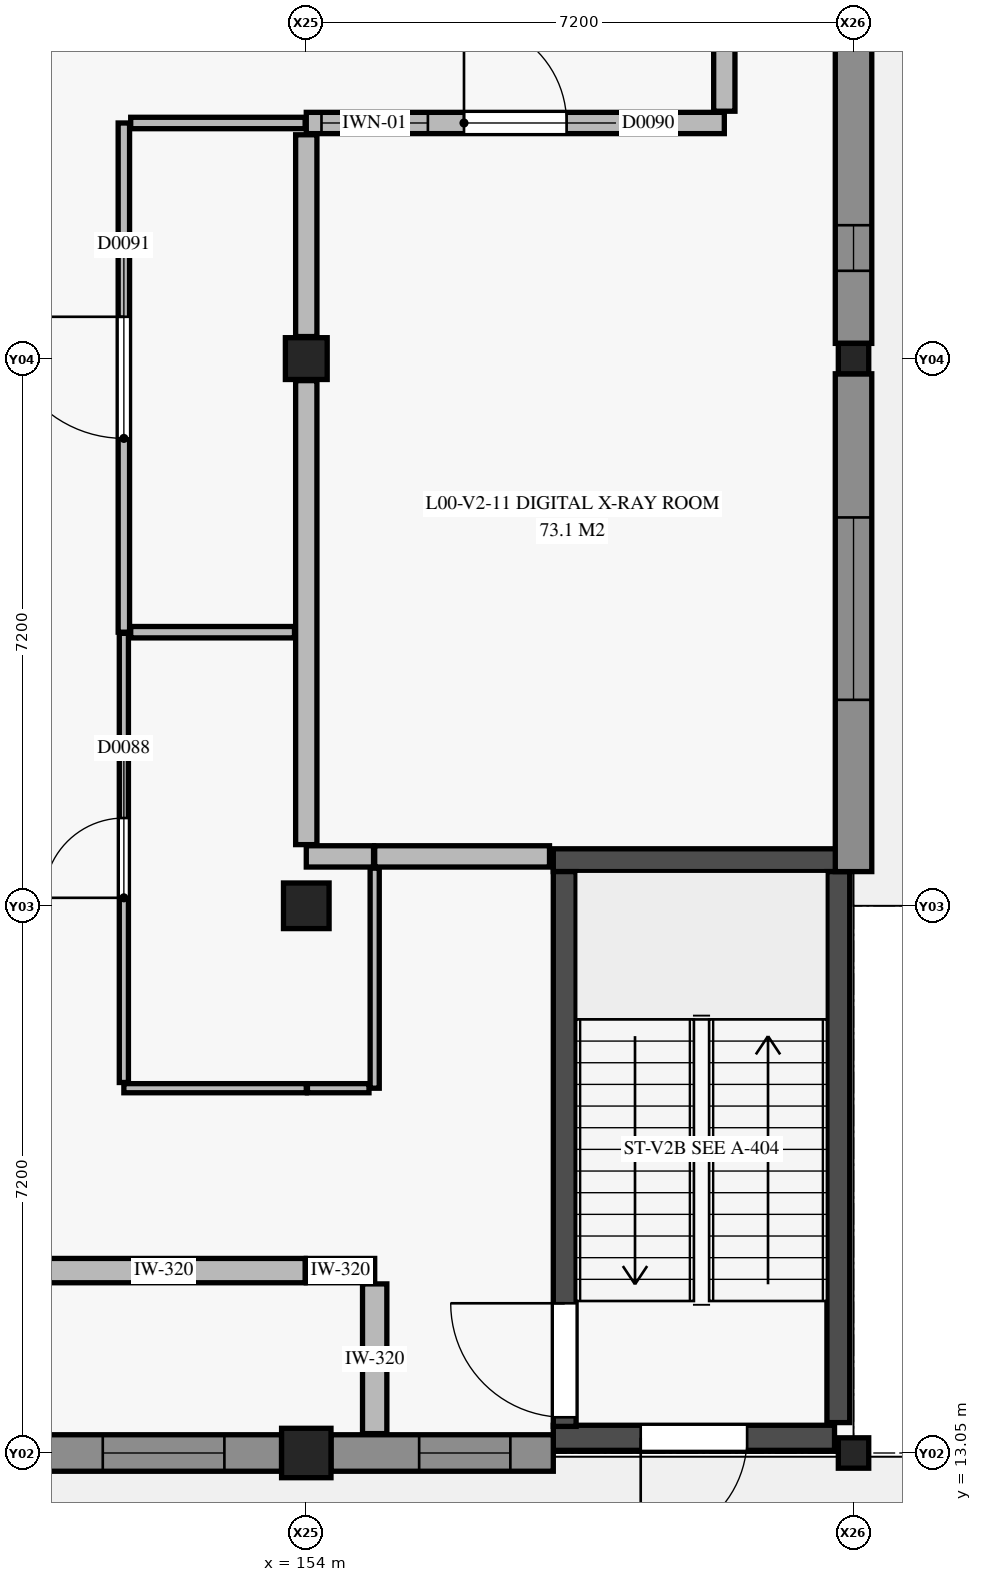
"""IFC4 building model, lengths in metres.
Left out: names, types, materials, properties, quantities, classifications, styles, units other than length and angle.
Written with IfcOpenShell. Run it as: python <this file> out.ifc"""

import sys

from ifc_helpers import new_model, si_unit, direction, frame, frame_2d, origin, origin_2d, place, context, subcontext, project, spatial, rectangle, extrude, element, fill, save


model = new_model("IFC4")
c1 = context("Model", 3, precision=1e-05, world=origin(), true_north=direction((0.0, 1.0)))
c2 = subcontext(c1, "Body", "Model", "MODEL_VIEW")
j1 = project(units=[si_unit("LENGTHUNIT", "METRE"), si_unit("PLANEANGLEUNIT", "RADIAN")], contexts=[c1])
p1 = place(None, origin())
s1 = spatial("IfcSite", under=j1, at=p1, CompositionType="ELEMENT")
p2 = place(p1, origin())
s2 = spatial("IfcBuilding", under=s1, at=p2, CompositionType="ELEMENT")
p3 = place(p2, origin())
s3 = spatial("IfcBuildingStorey", under=s2, at=p3, CompositionType="ELEMENT", Elevation=0.0)
p4 = place(p3, frame((154.0, 13.05, 0.0), z_axis=(0.0, 0.0, 1.0), x_axis=(1.0, 0.0, 0.0)))
e1 = element("IfcColumn", 1, at=p4, inside=s3, PredefinedType="COLUMN", context=c2, shape_type="SweptSolid", body=[
    extrude(rectangle(XDim=0.65, YDim=0.65, at=origin_2d()), origin(), (0.0, 0.0, 1.0), 4.8),
])
p5 = place(p3, frame((154.0, 20.25, 0.0), z_axis=(0.0, 0.0, 1.0), x_axis=(1.0, 0.0, 0.0)))
e2 = element("IfcColumn", 2, at=p5, inside=s3, PredefinedType="COLUMN", context=c2, shape_type="SweptSolid", body=[
    extrude(rectangle(XDim=0.6, YDim=0.6, at=origin_2d()), origin(), (0.0, 0.0, 1.0), 4.8),
])
p6 = place(p3, frame((154.0, 27.45, 0.0), z_axis=(0.0, 0.0, 1.0), x_axis=(1.0, 0.0, 0.0)))
e3 = element("IfcColumn", 3, at=p6, inside=s3, PredefinedType="COLUMN", context=c2, shape_type="SweptSolid", body=[
    extrude(rectangle(XDim=0.55, YDim=0.55, at=origin_2d()), origin(), (0.0, 0.0, 1.0), 4.8),
])
for number, where, z_axis, x_axis in (
    (4, (161.2, 27.45, 0.0), (0.0, 0.0, 1.0), (1.0, 0.0, 0.0)),
    (5, (161.2, 13.05, 0.0), (0.0, 0.0, 1.0), (1.0, 0.0, 0.0)),
):
    element("IfcColumn", number, at=place(p3, frame(where, z_axis=z_axis, x_axis=x_axis)), inside=s3, PredefinedType="COLUMN", context=c2, shape_type="SweptSolid", body=[
        extrude(rectangle(XDim=0.4, YDim=0.4, at=origin_2d()), origin(), (0.0, 0.0, 1.0), 4.8),
    ])
p7 = place(p3, frame((160.95, 13.25, 0.0), z_axis=(0.0, 0.0, 1.0), x_axis=(-1.0, 0.0, 0.0)))
e6 = element("IfcWall", 6, at=p7, inside=s3, PredefinedType="SHEAR", context=c2, shape_type="SweptSolid", body=[
    extrude(rectangle(XDim=3.7, YDim=0.33, at=frame_2d((1.85, 0.0))), origin(), (0.0, 0.0, 1.0), 4.46),
])
p8 = place(p7, frame((1.15, 0.0, 0.0)))
e7 = element("IfcOpeningElement", 7, at=p8, cuts=e6, PredefinedType="OPENING", context=c2, shape_type="SweptSolid", body=[
    extrude(rectangle(XDim=1.4, YDim=2.25, at=frame_2d((0.7, 1.125))), frame((0.0, 0.175, 0.0), z_axis=(0.0, -1.0, 0.0), x_axis=(1.0, 0.0, 0.0)), (0.0, 0.0, 1.0), 0.35),
])
p9 = place(p3, frame((157.25, 20.85, 0.0), z_axis=(0.0, 0.0, 1.0), x_axis=(1.0, 0.0, 0.0)))
e8 = element("IfcWall", 8, at=p9, inside=s3, PredefinedType="SHEAR", context=c2, shape_type="SweptSolid", body=[
    extrude(rectangle(XDim=3.9, YDim=0.3, at=frame_2d((1.95, 0.0))), origin(), (0.0, 0.0, 1.0), 4.46),
])
p10 = place(p3, frame((157.4, 13.4, 0.0), z_axis=(0.0, 0.0, 1.0), x_axis=(0.0, 1.0, 0.0)))
e9 = element("IfcWall", 9, at=p10, inside=s3, PredefinedType="SHEAR", context=c2, shape_type="SweptSolid", body=[
    extrude(rectangle(XDim=7.3, YDim=0.3, at=frame_2d((3.65, 0.0))), origin(), (0.0, 0.0, 1.0), 4.46),
])
p11 = place(p10, frame((0.12, 0.0, 0.0)))
e10 = element("IfcOpeningElement", 10, at=p11, cuts=e9, PredefinedType="OPENING", context=c2, shape_type="SweptSolid", body=[
    extrude(rectangle(XDim=1.5, YDim=2.15, at=frame_2d((0.75, 1.075))), frame((0.0, 0.16, 0.0), z_axis=(0.0, -1.0, 0.0), x_axis=(1.0, 0.0, 0.0)), (0.0, 0.0, 1.0), 0.32),
])
p12 = place(p3, frame((161.0, 13.45, 0.0), z_axis=(0.0, 0.0, 1.0), x_axis=(0.0, 1.0, 0.0)))
e11 = element("IfcWall", 11, at=p12, inside=s3, PredefinedType="SHEAR", context=c2, shape_type="SweptSolid", body=[
    extrude(rectangle(XDim=7.25, YDim=0.3, at=frame_2d((3.625, 0.0))), origin(), (0.0, 0.0, 1.0), 4.46),
])
p13 = place(p3, frame((157.25, 13.05, 0.0), z_axis=(0.0, 0.0, 1.0), x_axis=(-1.0, 0.0, 0.0)))
e12 = element("IfcWall", 12, at=p13, inside=s3, PredefinedType="SOLIDWALL", context=c2, shape_type="SweptSolid", body=[
    extrude(rectangle(XDim=2.925, YDim=0.48, at=frame_2d((1.462, 0.0))), origin(), (0.0, 0.0, 1.0), 3.64),
])
p14 = place(p13, frame((0.565, 0.0, 0.6)))
e13 = element("IfcOpeningElement", 13, at=p14, cuts=e12, PredefinedType="OPENING", context=c2, shape_type="SweptSolid", body=[
    extrude(rectangle(XDim=1.2, YDim=2.2, at=frame_2d((0.6, 1.1))), frame((0.0, 0.25, 0.0), z_axis=(0.0, -1.0, 0.0), x_axis=(1.0, 0.0, 0.0)), (0.0, 0.0, 1.0), 0.5),
])
p15 = place(p3, frame((153.675, 13.05, 0.0), z_axis=(0.0, 0.0, 1.0), x_axis=(-1.0, 0.0, 0.0)))
e14 = element("IfcWall", 14, at=p15, inside=s3, PredefinedType="SOLIDWALL", context=c2, shape_type="SweptSolid", body=[
    extrude(rectangle(XDim=3.105, YDim=0.48, at=frame_2d((1.552, 0.0))), origin(), (0.0, 0.0, 1.0), 3.64),
])
p16 = place(p15, frame((0.752, 0.0, 0.6)))
e15 = element("IfcOpeningElement", 15, at=p16, cuts=e14, PredefinedType="OPENING", context=c2, shape_type="SweptSolid", body=[
    extrude(rectangle(XDim=1.6, YDim=2.2, at=frame_2d((0.8, 1.1))), frame((0.0, 0.25, 0.0), z_axis=(0.0, -1.0, 0.0), x_axis=(1.0, 0.0, 0.0)), (0.0, 0.0, 1.0), 0.5),
])
p17 = place(p3, frame((161.2, 34.3, 0.0), z_axis=(0.0, 0.0, 1.0), x_axis=(0.0, -1.0, 0.0)))
e16 = element("IfcWall", 16, at=p17, inside=s3, PredefinedType="SOLIDWALL", context=c2, shape_type="SweptSolid", body=[
    extrude(rectangle(XDim=6.65, YDim=0.48, at=frame_2d((3.325, 0.0))), origin(), (0.0, 0.0, 1.0), 3.64),
])
p18 = place(p17, frame((1.65, 0.0, 0.6)))
e17 = element("IfcOpeningElement", 17, at=p18, cuts=e16, PredefinedType="OPENING", context=c2, shape_type="SweptSolid", body=[
    extrude(rectangle(XDim=0.8, YDim=2.6, at=frame_2d((0.4, 1.3))), frame((0.0, 0.25, 0.0), z_axis=(0.0, -1.0, 0.0), x_axis=(1.0, 0.0, 0.0)), (0.0, 0.0, 1.0), 0.5),
])
p19 = place(p17, frame((5.095, 0.0, 0.9)))
e18 = element("IfcOpeningElement", 18, at=p19, cuts=e16, PredefinedType="OPENING", context=c2, shape_type="SweptSolid", body=[
    extrude(rectangle(XDim=0.6, YDim=1.8, at=frame_2d((0.3, 0.9))), frame((0.0, 0.25, 0.0), z_axis=(0.0, -1.0, 0.0), x_axis=(1.0, 0.0, 0.0)), (0.0, 0.0, 1.0), 0.5),
])
p20 = place(p3, frame((161.2, 27.25, 0.0), z_axis=(0.0, 0.0, 1.0), x_axis=(0.0, -1.0, 0.0)))
e19 = element("IfcWall", 19, at=p20, inside=s3, PredefinedType="SOLIDWALL", context=c2, shape_type="SweptSolid", body=[
    extrude(rectangle(XDim=6.55, YDim=0.48, at=frame_2d((3.275, 0.0))), origin(), (0.0, 0.0, 1.0), 3.64),
])
p21 = place(p20, frame((1.89, 0.0, 0.6)))
e20 = element("IfcOpeningElement", 20, at=p21, cuts=e19, PredefinedType="OPENING", context=c2, shape_type="SweptSolid", body=[
    extrude(rectangle(XDim=2.4, YDim=2.2, at=frame_2d((1.2, 1.1))), frame((0.0, 0.25, 0.0), z_axis=(0.0, -1.0, 0.0), x_axis=(1.0, 0.0, 0.0)), (0.0, 0.0, 1.0), 0.5),
])
p22 = place(p3, frame((154.0, 15.45, 0.0), z_axis=(0.0, 0.0, 1.0), x_axis=(1.0, 0.0, 0.0)))
e21 = element("IfcWall", 21, at=p22, inside=s3, PredefinedType="PARTITIONING", context=c2, shape_type="SweptSolid", body=[
    extrude(rectangle(XDim=0.9, YDim=0.32, at=frame_2d((0.45, 0.0))), origin(), (0.0, 0.0, 1.0), 3.965),
])
p23 = place(p3, frame((154.9, 13.305, 0.0), z_axis=(0.0, 0.0, 1.0), x_axis=(0.0, 1.0, 0.0)))
e22 = element("IfcWall", 22, at=p23, inside=s3, PredefinedType="PARTITIONING", context=c2, shape_type="SweptSolid", body=[
    extrude(rectangle(XDim=1.97, YDim=0.32, at=frame_2d((0.985, 0.0))), origin(), (0.0, 0.0, 1.0), 4.46),
])
p24 = place(p3, frame((150.265, 15.45, 0.0), z_axis=(0.0, 0.0, 1.0), x_axis=(1.0, 0.0, 0.0)))
e23 = element("IfcWall", 23, at=p24, inside=s3, PredefinedType="PARTITIONING", context=c2, shape_type="SweptSolid", body=[
    extrude(rectangle(XDim=3.72, YDim=0.32, at=frame_2d((1.86, 0.0))), origin(), (0.0, 0.0, 1.0), 3.965),
])
p25 = place(p3, frame((154.9, 20.9, 0.0), z_axis=(0.0, 0.0, 1.0), x_axis=(1.0, 0.0, 0.0)))
e24 = element("IfcWall", 24, at=p25, inside=s3, PredefinedType="PARTITIONING", context=c2, shape_type="SweptSolid", body=[
    extrude(rectangle(XDim=2.3, YDim=0.28, at=frame_2d((1.15, 0.0))), origin(), (0.0, 0.0, 1.0), 4.46),
])
p26 = place(p3, frame((154.0, 30.55, 0.0), z_axis=(0.0, 0.0, 1.0), x_axis=(1.0, 0.0, 0.0)))
e25 = element("IfcWall", 25, at=p26, inside=s3, PredefinedType="PARTITIONING", context=c2, shape_type="SweptSolid", body=[
    extrude(rectangle(XDim=5.5, YDim=0.28, at=frame_2d((2.75, 0.0))), origin(), (0.0, 0.0, 1.0), 3.795),
])
p27 = place(p26, frame((2.075, 0.0, 0.0)))
e26 = element("IfcOpeningElement", 26, at=p27, cuts=e25, PredefinedType="OPENING", context=c2, shape_type="SweptSolid", body=[
    extrude(rectangle(XDim=1.35, YDim=2.2, at=frame_2d((0.675, 1.1))), frame((0.0, 0.15, 0.0), z_axis=(0.0, -1.0, 0.0), x_axis=(1.0, 0.0, 0.0)), (0.0, 0.0, 1.0), 0.3),
])
p28 = place(p26, frame((0.2, 0.0, 1.05)))
e27 = element("IfcOpeningElement", 27, at=p28, cuts=e25, PredefinedType="OPENING", context=c2, shape_type="SweptSolid", body=[
    extrude(rectangle(XDim=1.4, YDim=1.1, at=frame_2d((0.7, 0.55))), frame((0.0, 0.15, 0.0), z_axis=(0.0, -1.0, 0.0), x_axis=(1.0, 0.0, 0.0)), (0.0, 0.0, 1.0), 0.3),
])
p29 = place(p3, frame((159.5, 30.705, 0.0), z_axis=(0.0, 0.0, 1.0), x_axis=(0.0, 1.0, 0.0)))
e28 = element("IfcWall", 28, at=p29, inside=s3, PredefinedType="PARTITIONING", context=c2, shape_type="SweptSolid", body=[
    extrude(rectangle(XDim=2.13, YDim=0.28, at=frame_2d((1.065, 0.0))), origin(), (0.0, 0.0, 1.0), 3.985),
])
p30 = place(p3, frame((151.6, 23.85, 0.0), z_axis=(0.0, 0.0, 1.0), x_axis=(0.0, 1.0, 0.0)))
e29 = element("IfcWall", 29, at=p30, inside=s3, PredefinedType="PARTITIONING", context=c2, shape_type="SweptSolid", body=[
    extrude(rectangle(XDim=6.7, YDim=0.15, at=frame_2d((3.35, 0.0))), origin(), (0.0, 0.0, 1.0), 3.725),
])
p31 = place(p30, frame((2.55, 0.0, 0.0)))
e30 = element("IfcOpeningElement", 30, at=p31, cuts=e29, PredefinedType="OPENING", context=c2, shape_type="SweptSolid", body=[
    extrude(rectangle(XDim=1.6, YDim=2.25, at=frame_2d((0.8, 1.125))), frame((0.0, 0.085, 0.0), z_axis=(0.0, -1.0, 0.0), x_axis=(1.0, 0.0, 0.0)), (0.0, 0.0, 1.0), 0.17),
])
p32 = place(p3, frame((151.69, 30.55, 0.0), z_axis=(0.0, 0.0, 1.0), x_axis=(1.0, 0.0, 0.0)))
e31 = element("IfcWall", 31, at=p32, inside=s3, PredefinedType="PARTITIONING", context=c2, shape_type="SweptSolid", body=[
    extrude(rectangle(XDim=2.295, YDim=0.15, at=frame_2d((1.147, 0.0))), origin(), (0.0, 0.0, 1.0), 3.795),
])
p33 = place(p3, frame((151.6, 17.85, 0.0), z_axis=(0.0, 0.0, 1.0), x_axis=(1.0, 0.0, 0.0)))
e32 = element("IfcWall", 32, at=p33, inside=s3, PredefinedType="PARTITIONING", context=c2, shape_type="SweptSolid", body=[
    extrude(rectangle(XDim=2.4, YDim=0.12, at=frame_2d((1.2, 0.0))), origin(), (0.0, 0.0, 1.0), 3.965),
])
p34 = place(p3, frame((151.6, 17.925, 0.0), z_axis=(0.0, 0.0, 1.0), x_axis=(0.0, 1.0, 0.0)))
e33 = element("IfcWall", 33, at=p34, inside=s3, PredefinedType="PARTITIONING", context=c2, shape_type="SweptSolid", body=[
    extrude(rectangle(XDim=5.91, YDim=0.12, at=frame_2d((2.955, 0.0))), origin(), (0.0, 0.0, 1.0), 3.865),
])
p35 = place(p34, frame((2.43, 0.0, 0.0)))
e34 = element("IfcOpeningElement", 34, at=p35, cuts=e33, PredefinedType="OPENING", context=c2, shape_type="SweptSolid", body=[
    extrude(rectangle(XDim=1.05, YDim=2.15, at=frame_2d((0.525, 1.075))), frame((0.0, 0.07, 0.0), z_axis=(0.0, -1.0, 0.0), x_axis=(1.0, 0.0, 0.0)), (0.0, 0.0, 1.0), 0.14),
])
p36 = place(p3, frame((154.9, 17.85, 0.0), z_axis=(0.0, 0.0, 1.0), x_axis=(0.0, 1.0, 0.0)))
e35 = element("IfcWall", 35, at=p36, inside=s3, PredefinedType="PARTITIONING", context=c2, shape_type="SweptSolid", body=[
    extrude(rectangle(XDim=2.895, YDim=0.12, at=frame_2d((1.448, 0.0))), origin(), (0.0, 0.0, 1.0), 4.46),
])
p37 = place(p3, frame((154.015, 17.85, 0.0), z_axis=(0.0, 0.0, 1.0), x_axis=(1.0, 0.0, 0.0)))
e36 = element("IfcWall", 36, at=p37, inside=s3, PredefinedType="PARTITIONING", context=c2, shape_type="SweptSolid", body=[
    extrude(rectangle(XDim=0.81, YDim=0.12, at=frame_2d((0.405, 0.0))), origin(), (0.0, 0.0, 1.0), 3.965),
])
p38 = place(p3, frame((154.0, 20.9, 0.0), z_axis=(0.0, 0.0, 1.0), x_axis=(1.0, 0.0, 0.0)))
e37 = element("IfcWall", 37, at=p38, inside=s3, PredefinedType="PARTITIONING", context=c2, shape_type="SweptSolid", body=[
    extrude(rectangle(XDim=0.885, YDim=0.28, at=frame_2d((0.442, 0.0))), origin(), (0.0, 0.0, 1.0), 3.725),
])
p39 = place(p3, frame((154.0, 21.055, 0.0), z_axis=(0.0, 0.0, 1.0), x_axis=(0.0, 1.0, 0.0)))
e38 = element("IfcWall", 38, at=p39, inside=s3, PredefinedType="PARTITIONING", context=c2, shape_type="SweptSolid", body=[
    extrude(rectangle(XDim=6.105, YDim=0.28, at=frame_2d((3.052, 0.0))), origin(), (0.0, 0.0, 1.0), 3.725),
])
p40 = place(p3, frame((154.0, 27.74, 0.0), z_axis=(0.0, 0.0, 1.0), x_axis=(0.0, 1.0, 0.0)))
e39 = element("IfcWall", 39, at=p40, inside=s3, PredefinedType="PARTITIONING", context=c2, shape_type="SweptSolid", body=[
    extrude(rectangle(XDim=2.655, YDim=0.28, at=frame_2d((1.328, 0.0))), origin(), (0.0, 0.0, 1.0), 3.795),
])
p41 = place(p3, frame((151.69, 23.85, 0.0), z_axis=(0.0, 0.0, 1.0), x_axis=(1.0, 0.0, 0.0)))
e40 = element("IfcWall", 40, at=p41, inside=s3, PredefinedType="PARTITIONING", context=c2, shape_type="SweptSolid", body=[
    extrude(rectangle(XDim=2.155, YDim=0.15, at=frame_2d((1.078, 0.0))), origin(), (0.0, 0.0, 1.0), 4.46),
])
p42 = place(p8, origin())
e41 = element("IfcDoor", 41, at=p42, inside=s3, OperationType="SINGLE_SWING_RIGHT", PredefinedType="DOOR", context=c2, shape_type="SweptSolid", body=[
    extrude(rectangle(XDim=1.4, YDim=2.25, at=frame_2d((0.7, 1.125))), frame((0.0, 0.025, 0.0), z_axis=(0.0, -1.0, 0.0), x_axis=(1.0, 0.0, 0.0)), (0.0, 0.0, 1.0), 0.05),
])
fill(e7, e41)
p43 = place(p14, origin())
e42 = element("IfcWindow", 42, at=p43, inside=s3, PartitioningType="SINGLE_PANEL", PredefinedType="WINDOW", context=c2, shape_type="SweptSolid", body=[
    extrude(rectangle(XDim=1.2, YDim=2.2, at=frame_2d((0.6, 1.1))), frame((0.0, 0.03, 0.0), z_axis=(0.0, -1.0, 0.0), x_axis=(1.0, 0.0, 0.0)), (0.0, 0.0, 1.0), 0.06),
])
fill(e13, e42)
p44 = place(p16, origin())
e43 = element("IfcWindow", 43, at=p44, inside=s3, PartitioningType="SINGLE_PANEL", PredefinedType="WINDOW", context=c2, shape_type="SweptSolid", body=[
    extrude(rectangle(XDim=1.6, YDim=2.2, at=frame_2d((0.8, 1.1))), frame((0.0, 0.03, 0.0), z_axis=(0.0, -1.0, 0.0), x_axis=(1.0, 0.0, 0.0)), (0.0, 0.0, 1.0), 0.06),
])
fill(e15, e43)
p45 = place(p19, origin())
e44 = element("IfcWindow", 44, at=p45, inside=s3, PartitioningType="SINGLE_PANEL", PredefinedType="WINDOW", context=c2, shape_type="SweptSolid", body=[
    extrude(rectangle(XDim=0.6, YDim=1.8, at=frame_2d((0.3, 0.9))), frame((0.0, 0.03, 0.0), z_axis=(0.0, -1.0, 0.0), x_axis=(1.0, 0.0, 0.0)), (0.0, 0.0, 1.0), 0.06),
])
fill(e18, e44)
p46 = place(p21, origin())
e45 = element("IfcWindow", 45, at=p46, inside=s3, PartitioningType="SINGLE_PANEL", PredefinedType="WINDOW", context=c2, shape_type="SweptSolid", body=[
    extrude(rectangle(XDim=2.4, YDim=2.2, at=frame_2d((1.2, 1.1))), frame((0.0, 0.03, 0.0), z_axis=(0.0, -1.0, 0.0), x_axis=(1.0, 0.0, 0.0)), (0.0, 0.0, 1.0), 0.06),
])
fill(e20, e45)
p47 = place(p11, origin())
e46 = element("IfcDoor", 46, at=p47, inside=s3, OperationType="SINGLE_SWING_RIGHT", PredefinedType="DOOR", context=c2, shape_type="SweptSolid", body=[
    extrude(rectangle(XDim=1.5, YDim=2.15, at=frame_2d((0.75, 1.075))), frame((0.0, 0.025, 0.0), z_axis=(0.0, -1.0, 0.0), x_axis=(1.0, 0.0, 0.0)), (0.0, 0.0, 1.0), 0.05),
])
fill(e10, e46)
p48 = place(p35, origin())
e47 = element("IfcDoor", 47, at=p48, inside=s3, OperationType="SINGLE_SWING_LEFT", PredefinedType="DOOR", context=c2, shape_type="SweptSolid", body=[
    extrude(rectangle(XDim=1.05, YDim=2.15, at=frame_2d((0.525, 1.075))), frame((0.0, 0.025, 0.0), z_axis=(0.0, -1.0, 0.0), x_axis=(1.0, 0.0, 0.0)), (0.0, 0.0, 1.0), 0.05),
])
fill(e34, e47)
p49 = place(p27, origin())
e48 = element("IfcDoor", 48, at=p49, inside=s3, OperationType="SINGLE_SWING_LEFT", PredefinedType="DOOR", context=c2, shape_type="SweptSolid", body=[
    extrude(rectangle(XDim=1.35, YDim=2.2, at=frame_2d((0.675, 1.1))), frame((0.0, 0.025, 0.0), z_axis=(0.0, -1.0, 0.0), x_axis=(1.0, 0.0, 0.0)), (0.0, 0.0, 1.0), 0.05),
])
fill(e26, e48)
p50 = place(p28, origin())
e49 = element("IfcWindow", 49, at=p50, inside=s3, PartitioningType="SINGLE_PANEL", PredefinedType="WINDOW", context=c2, shape_type="SweptSolid", body=[
    extrude(rectangle(XDim=1.4, YDim=1.1, at=frame_2d((0.7, 0.55))), frame((0.0, 0.03, 0.0), z_axis=(0.0, -1.0, 0.0), x_axis=(1.0, 0.0, 0.0)), (0.0, 0.0, 1.0), 0.06),
])
fill(e27, e49)
p51 = place(p31, origin())
e50 = element("IfcDoor", 50, at=p51, inside=s3, OperationType="SINGLE_SWING_RIGHT", PredefinedType="DOOR", context=c2, shape_type="SweptSolid", body=[
    extrude(rectangle(XDim=1.6, YDim=2.25, at=frame_2d((0.8, 1.125))), frame((0.0, 0.025, 0.0), z_axis=(0.0, -1.0, 0.0), x_axis=(1.0, 0.0, 0.0)), (0.0, 0.0, 1.0), 0.05),
])
fill(e30, e50)
save(model, sys.argv[1])
